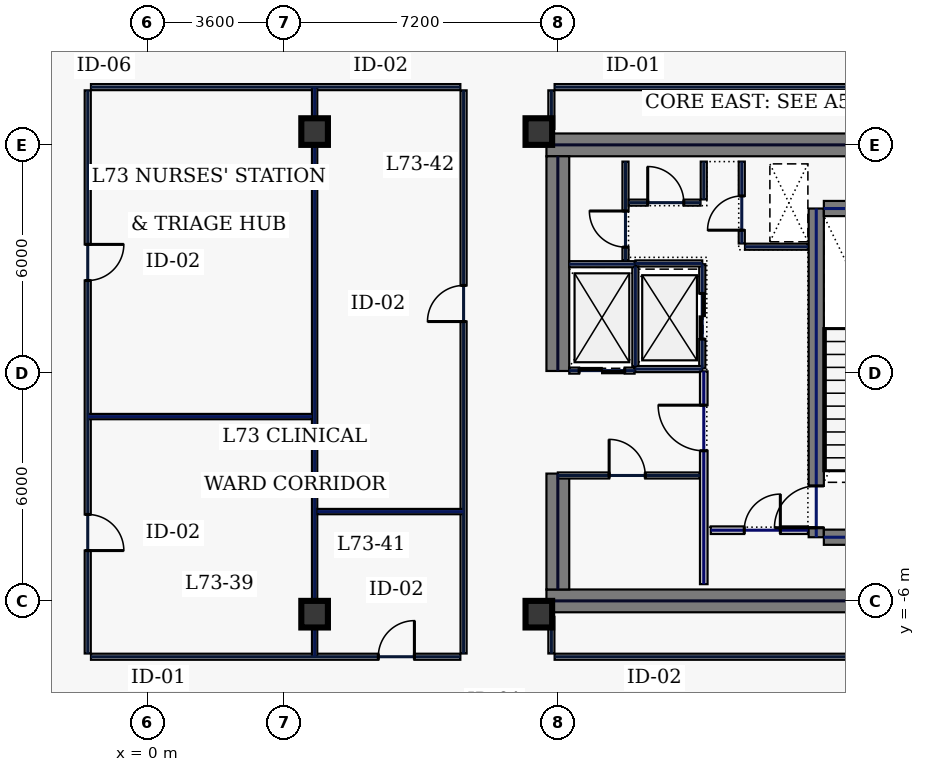
"""IFC4 building model, lengths in metres.
Left out: names, types, materials, properties, quantities, classifications, styles, units other than length and angle.
Written with IfcOpenShell. Run it as: python <this file> out.ifc"""

import sys

from ifc_helpers import new_model, si_unit, direction, frame, frame_2d, origin, origin_2d, place, context, subcontext, project, spatial, rectangle, hollow_rectangle, extrude, element, fill, save


model = new_model("IFC4")
c1 = context("Model", 3, precision=1e-05, world=origin(), true_north=direction((0.0, 1.0)))
c2 = subcontext(c1, "Body", "Model", "MODEL_VIEW")
j1 = project(units=[si_unit("LENGTHUNIT", "METRE"), si_unit("PLANEANGLEUNIT", "RADIAN")], contexts=[c1])
p1 = place(None, origin())
s1 = spatial("IfcSite", under=j1, at=p1, CompositionType="ELEMENT")
p2 = place(p1, origin())
s2 = spatial("IfcBuilding", under=s1, at=p2, CompositionType="ELEMENT")
p3 = place(p2, frame((0.0, 0.0, 313.0)))
s3 = spatial("IfcBuildingStorey", under=s2, at=p3, CompositionType="ELEMENT", Elevation=313.0)
for number, where, z_axis, x_axis in (
    (1, (10.5, 6.0, 0.0), (0.0, 0.0, 1.0), (1.0, 0.0, 0.0)),
    (2, (10.5, -6.0, 0.0), (0.0, 0.0, 1.0), (1.0, 0.0, 0.0)),
):
    element("IfcWall", number, at=place(p3, frame(where, z_axis=z_axis, x_axis=x_axis)), inside=s3, PredefinedType="SHEAR", context=c2, shape_type="SweptSolid", body=[
        extrude(rectangle(XDim=11.5, YDim=0.6, at=frame_2d((5.75, 0.0))), origin(), (0.0, 0.0, 1.0), 3.74),
    ])
p4 = place(p3, frame((10.8, -5.7, 0.0), z_axis=(0.0, 0.0, 1.0), x_axis=(0.0, 1.0, 0.0)))
e3 = element("IfcWall", 3, at=p4, inside=s3, PredefinedType="SHEAR", context=c2, shape_type="SweptSolid", body=[
    extrude(rectangle(XDim=3.05, YDim=0.6, at=frame_2d((1.525, 0.0))), origin(), (0.0, 0.0, 1.0), 3.74),
])
p5 = place(p3, frame((10.8, 0.05, 0.0), z_axis=(0.0, 0.0, 1.0), x_axis=(0.0, 1.0, 0.0)))
e4 = element("IfcWall", 4, at=p5, inside=s3, PredefinedType="SHEAR", context=c2, shape_type="SweptSolid", body=[
    extrude(rectangle(XDim=5.65, YDim=0.6, at=frame_2d((2.825, 0.0))), origin(), (0.0, 0.0, 1.0), 3.74),
])
p6 = place(p3, frame((17.6, -4.325, 0.0), z_axis=(0.0, 0.0, 1.0), x_axis=(0.0, 1.0, 0.0)))
e5 = element("IfcWall", 5, at=p6, inside=s3, PredefinedType="SHEAR", context=c2, shape_type="SweptSolid", body=[
    extrude(rectangle(XDim=8.65, YDim=0.4, at=frame_2d((4.325, 0.0))), origin(), (0.0, 0.0, 1.0), 3.74),
])
p7 = place(p6, frame((0.25, 0.0, 0.0)))
e6 = element("IfcOpeningElement", 6, at=p7, cuts=e5, PredefinedType="OPENING", context=c2, shape_type="SweptSolid", body=[
    extrude(rectangle(XDim=1.1, YDim=2.2, at=frame_2d((0.55, 1.1))), frame((0.0, 0.21, 0.0), z_axis=(0.0, -1.0, 0.0), x_axis=(1.0, 0.0, 0.0)), (0.0, 0.0, 1.0), 0.42),
])
for number, where, z_axis, x_axis in (
    (7, (17.8, -4.325, 0.0), (0.0, 0.0, 1.0), (1.0, 0.0, 0.0)),
    (8, (17.8, 4.325, 0.0), (0.0, 0.0, 1.0), (1.0, 0.0, 0.0)),
):
    element("IfcWall", number, at=place(p3, frame(where, z_axis=z_axis, x_axis=x_axis)), inside=s3, PredefinedType="SHEAR", context=c2, shape_type="SweptSolid", body=[
        extrude(rectangle(XDim=3.4, YDim=0.4, at=frame_2d((1.7, 0.0))), origin(), (0.0, 0.0, 1.0), 3.74),
    ])
for number, where, z_axis, x_axis in (
    (9, (10.3, -6.35, 0.0), (0.0, 0.0, 1.0), (1.0, 0.0, 0.0)),
    (10, (10.3, 6.35, 0.0), (0.0, 0.0, 1.0), (1.0, 0.0, 0.0)),
    (11, (4.4, -6.35, 0.0), (0.0, 0.0, 1.0), (1.0, 0.0, 0.0)),
    (12, (4.4, 6.35, 0.0), (0.0, 0.0, 1.0), (1.0, 0.0, 0.0)),
):
    element("IfcColumn", number, at=place(p3, frame(where, z_axis=z_axis, x_axis=x_axis)), inside=s3, PredefinedType="COLUMN", context=c2, shape_type="SweptSolid", body=[
        extrude(hollow_rectangle(XDim=0.7, YDim=0.7, WallThickness=0.032, at=origin_2d()), origin(), (0.0, 0.0, 1.0), 3.74),
    ])
p8 = place(p3, frame((14.6, 0.12, 0.0), z_axis=(0.0, 0.0, 1.0), x_axis=(0.0, 1.0, 0.0)))
e13 = element("IfcWall", 13, at=p8, inside=s3, PredefinedType="PARTITIONING", context=c2, shape_type="SweptSolid", body=[
    extrude(rectangle(XDim=2.74, YDim=0.16, at=frame_2d((1.37, 0.0))), origin(), (0.0, 0.0, 1.0), 3.74),
])
p9 = place(p8, frame((0.77, 0.0, 0.0)))
e14 = element("IfcOpeningElement", 14, at=p9, cuts=e13, PredefinedType="OPENING", context=c2, shape_type="SweptSolid", body=[
    extrude(rectangle(XDim=1.2, YDim=2.2, at=frame_2d((0.6, 1.1))), frame((0.0, 0.09, 0.0), z_axis=(0.0, -1.0, 0.0), x_axis=(1.0, 0.0, 0.0)), (0.0, 0.0, 1.0), 0.18),
])
for number, where, z_axis, x_axis in (
    (15, (12.84, 0.1, 0.0), (0.0, 0.0, 1.0), (1.0, 0.0, 0.0)),
    (16, (12.84, 2.88, 0.0), (0.0, 0.0, 1.0), (1.0, 0.0, 0.0)),
):
    element("IfcWall", number, at=place(p3, frame(where, z_axis=z_axis, x_axis=x_axis)), inside=s3, PredefinedType="PARTITIONING", context=c2, shape_type="SweptSolid", body=[
        extrude(rectangle(XDim=1.76, YDim=0.16, at=frame_2d((0.88, 0.0))), origin(), (0.0, 0.0, 1.0), 3.74),
    ])
p10 = place(p3, frame((12.84, 0.18, 0.0), z_axis=(0.0, 0.0, 1.0), x_axis=(0.0, 1.0, 0.0)))
e17 = element("IfcWall", 17, at=p10, inside=s3, PredefinedType="PARTITIONING", context=c2, shape_type="SweptSolid", body=[
    extrude(rectangle(XDim=2.62, YDim=0.16, at=frame_2d((1.31, 0.0))), origin(), (0.0, 0.0, 1.0), 3.74),
])
p11 = place(p3, frame((11.1, 0.06, 0.0), z_axis=(0.0, 0.0, 1.0), x_axis=(1.0, 0.0, 0.0)))
e18 = element("IfcWall", 18, at=p11, inside=s3, PredefinedType="PARTITIONING", context=c2, shape_type="SweptSolid", body=[
    extrude(rectangle(XDim=1.72, YDim=0.16, at=frame_2d((0.86, 0.0))), origin(), (0.0, 0.0, 1.0), 3.74),
])
p12 = place(p11, frame((0.26, 0.0, 0.0)))
e19 = element("IfcOpeningElement", 19, at=p12, cuts=e18, PredefinedType="OPENING", context=c2, shape_type="SweptSolid", body=[
    extrude(rectangle(XDim=1.2, YDim=2.2, at=frame_2d((0.6, 1.1))), frame((0.0, 0.09, 0.0), z_axis=(0.0, -1.0, 0.0), x_axis=(1.0, 0.0, 0.0)), (0.0, 0.0, 1.0), 0.18),
])
p13 = place(p3, frame((11.1, 2.86, 0.0), z_axis=(0.0, 0.0, 1.0), x_axis=(1.0, 0.0, 0.0)))
e20 = element("IfcWall", 20, at=p13, inside=s3, PredefinedType="PARTITIONING", context=c2, shape_type="SweptSolid", body=[
    extrude(rectangle(XDim=1.72, YDim=0.16, at=frame_2d((0.86, 0.0))), origin(), (0.0, 0.0, 1.0), 3.74),
])
p14 = place(p3, frame((15.64, 3.405, 0.0), z_axis=(0.0, 0.0, 1.0), x_axis=(0.0, 1.0, 0.0)))
e21 = element("IfcWall", 21, at=p14, inside=s3, PredefinedType="PARTITIONING", context=c2, shape_type="SweptSolid", body=[
    extrude(rectangle(XDim=2.155, YDim=0.16, at=frame_2d((1.078, 0.0))), origin(), (0.0, 0.0, 1.0), 3.74),
])
p15 = place(p14, frame((0.35, 0.0, 0.0)))
e22 = element("IfcOpeningElement", 22, at=p15, cuts=e21, PredefinedType="OPENING", context=c2, shape_type="SweptSolid", body=[
    extrude(rectangle(XDim=0.9, YDim=2.2, at=frame_2d((0.45, 1.1))), frame((0.0, 0.09, 0.0), z_axis=(0.0, -1.0, 0.0), x_axis=(1.0, 0.0, 0.0)), (0.0, 0.0, 1.0), 0.18),
])
p16 = place(p3, frame((15.725, 3.32, 0.0), z_axis=(0.0, 0.0, 1.0), x_axis=(1.0, 0.0, 0.0)))
e23 = element("IfcWall", 23, at=p16, inside=s3, PredefinedType="PARTITIONING", context=c2, shape_type="SweptSolid", body=[
    extrude(rectangle(XDim=1.655, YDim=0.16, at=frame_2d((0.827, 0.0))), origin(), (0.0, 0.0, 1.0), 3.74),
])
p17 = place(p3, frame((14.825, -4.14, 0.0), z_axis=(0.0, 0.0, 1.0), x_axis=(1.0, 0.0, 0.0)))
e24 = element("IfcWall", 24, at=p17, inside=s3, PredefinedType="SOLIDWALL", context=c2, shape_type="SweptSolid", body=[
    extrude(rectangle(XDim=2.555, YDim=0.2, at=frame_2d((1.277, 0.0))), origin(), (0.0, 0.0, 1.0), 3.74),
])
p18 = place(p17, frame((0.88, 0.0, 0.0)))
e25 = element("IfcOpeningElement", 25, at=p18, cuts=e24, PredefinedType="OPENING", context=c2, shape_type="SweptSolid", body=[
    extrude(rectangle(XDim=0.95, YDim=2.2, at=frame_2d((0.475, 1.1))), frame((0.0, 0.11, 0.0), z_axis=(0.0, -1.0, 0.0), x_axis=(1.0, 0.0, 0.0)), (0.0, 0.0, 1.0), 0.22),
])
p19 = place(p3, frame((10.8, -2.7, 0.0), z_axis=(0.0, 0.0, 1.0), x_axis=(1.0, 0.0, 0.0)))
e26 = element("IfcWall", 26, at=p19, inside=s3, PredefinedType="PARTITIONING", context=c2, shape_type="SweptSolid", body=[
    extrude(rectangle(XDim=3.735, YDim=0.16, at=frame_2d((1.867, 0.0))), origin(), (0.0, 0.0, 1.0), 3.74),
])
p20 = place(p19, frame((1.35, 0.0, 0.0)))
e27 = element("IfcOpeningElement", 27, at=p20, cuts=e26, PredefinedType="OPENING", context=c2, shape_type="SweptSolid", body=[
    extrude(rectangle(XDim=0.95, YDim=2.2, at=frame_2d((0.475, 1.1))), frame((0.0, 0.09, 0.0), z_axis=(0.0, -1.0, 0.0), x_axis=(1.0, 0.0, 0.0)), (0.0, 0.0, 1.0), 0.18),
])
p21 = place(p3, frame((12.58, 2.96, 0.0), z_axis=(0.0, 0.0, 1.0), x_axis=(0.0, 1.0, 0.0)))
e28 = element("IfcWall", 28, at=p21, inside=s3, PredefinedType="PARTITIONING", context=c2, shape_type="SweptSolid", body=[
    extrude(rectangle(XDim=2.6, YDim=0.16, at=frame_2d((1.3, 0.0))), origin(), (0.0, 0.0, 1.0), 3.74),
])
p22 = place(p21, frame((0.35, 0.0, 0.0)))
e29 = element("IfcOpeningElement", 29, at=p22, cuts=e28, PredefinedType="OPENING", context=c2, shape_type="SweptSolid", body=[
    extrude(rectangle(XDim=0.95, YDim=2.2, at=frame_2d((0.475, 1.1))), frame((0.0, 0.09, 0.0), z_axis=(0.0, -1.0, 0.0), x_axis=(1.0, 0.0, 0.0)), (0.0, 0.0, 1.0), 0.18),
])
p23 = place(p3, frame((12.665, 4.48, 0.0), z_axis=(0.0, 0.0, 1.0), x_axis=(1.0, 0.0, 0.0)))
e30 = element("IfcWall", 30, at=p23, inside=s3, PredefinedType="PARTITIONING", context=c2, shape_type="SweptSolid", body=[
    extrude(rectangle(XDim=1.89, YDim=0.16, at=frame_2d((0.945, 0.0))), origin(), (0.0, 0.0, 1.0), 3.74),
])
p24 = place(p23, frame((0.5, 0.0, 0.0)))
e31 = element("IfcOpeningElement", 31, at=p24, cuts=e30, PredefinedType="OPENING", context=c2, shape_type="SweptSolid", body=[
    extrude(rectangle(XDim=0.95, YDim=2.2, at=frame_2d((0.475, 1.1))), frame((0.0, 0.09, 0.0), z_axis=(0.0, -1.0, 0.0), x_axis=(1.0, 0.0, 0.0)), (0.0, 0.0, 1.0), 0.18),
])
p25 = place(p3, frame((14.64, 4.565, 0.0), z_axis=(0.0, 0.0, 1.0), x_axis=(0.0, 1.0, 0.0)))
e32 = element("IfcWall", 32, at=p25, inside=s3, PredefinedType="PARTITIONING", context=c2, shape_type="SweptSolid", body=[
    extrude(rectangle(XDim=0.995, YDim=0.16, at=frame_2d((0.498, 0.0))), origin(), (0.0, 0.0, 1.0), 3.74),
])
p26 = place(p3, frame((14.64, -5.56, 0.0), z_axis=(0.0, 0.0, 1.0), x_axis=(0.0, 1.0, 0.0)))
e33 = element("IfcWall", 33, at=p26, inside=s3, PredefinedType="SOLIDWALL", context=c2, shape_type="SweptSolid", body=[
    extrude(rectangle(XDim=5.6, YDim=0.2, at=frame_2d((2.8, 0.0))), origin(), (0.0, 0.0, 1.0), 3.74),
])
p27 = place(p26, frame((3.51, 0.0, 0.0)))
e34 = element("IfcOpeningElement", 34, at=p27, cuts=e33, PredefinedType="OPENING", context=c2, shape_type="SweptSolid", body=[
    extrude(rectangle(XDim=1.2, YDim=2.2, at=frame_2d((0.6, 1.1))), frame((0.0, 0.11, 0.0), z_axis=(0.0, -1.0, 0.0), x_axis=(1.0, 0.0, 0.0)), (0.0, 0.0, 1.0), 0.22),
])
p28 = place(p3, frame((21.915, 7.52, 0.0), z_axis=(0.0, 0.0, 1.0), x_axis=(-1.0, 0.0, 0.0)))
e35 = element("IfcWall", 35, at=p28, inside=s3, PredefinedType="PARTITIONING", context=c2, shape_type="SweptSolid", body=[
    extrude(rectangle(XDim=11.2, YDim=0.16, at=frame_2d((5.6, 0.0))), origin(), (0.0, 0.0, 1.0), 3.74),
])
p29 = place(p3, frame((10.63, 7.435, 0.0), z_axis=(0.0, 0.0, 1.0), x_axis=(0.0, -1.0, 0.0)))
e36 = element("IfcWall", 36, at=p29, inside=s3, PredefinedType="PARTITIONING", context=c2, shape_type="SweptSolid", body=[
    extrude(rectangle(XDim=1.015, YDim=0.16, at=frame_2d((0.508, 0.0))), origin(), (0.0, 0.0, 1.0), 3.74),
])
p30 = place(p3, frame((10.63, -6.42, 0.0), z_axis=(0.0, 0.0, 1.0), x_axis=(0.0, -1.0, 0.0)))
e37 = element("IfcWall", 37, at=p30, inside=s3, PredefinedType="PARTITIONING", context=c2, shape_type="SweptSolid", body=[
    extrude(rectangle(XDim=0.965, YDim=0.16, at=frame_2d((0.482, 0.0))), origin(), (0.0, 0.0, 1.0), 3.74),
])
p31 = place(p3, frame((10.715, -7.47, 0.0), z_axis=(0.0, 0.0, 1.0), x_axis=(1.0, 0.0, 0.0)))
e38 = element("IfcWall", 38, at=p31, inside=s3, PredefinedType="PARTITIONING", context=c2, shape_type="SweptSolid", body=[
    extrude(rectangle(XDim=11.2, YDim=0.16, at=frame_2d((5.6, 0.0))), origin(), (0.0, 0.0, 1.0), 3.74),
])
p32 = place(p3, frame((8.235, 7.52, 0.0), z_axis=(0.0, 0.0, 1.0), x_axis=(-1.0, 0.0, 0.0)))
e39 = element("IfcWall", 39, at=p32, inside=s3, PredefinedType="PARTITIONING", context=c2, shape_type="SweptSolid", body=[
    extrude(rectangle(XDim=9.72, YDim=0.16, at=frame_2d((4.86, 0.0))), origin(), (0.0, 0.0, 1.0), 3.74),
])
p33 = place(p3, frame((-1.57, 7.435, 0.0), z_axis=(0.0, 0.0, 1.0), x_axis=(0.0, -1.0, 0.0)))
e40 = element("IfcWall", 40, at=p33, inside=s3, PredefinedType="PARTITIONING", context=c2, shape_type="SweptSolid", body=[
    extrude(rectangle(XDim=14.82, YDim=0.16, at=frame_2d((7.41, 0.0))), origin(), (0.0, 0.0, 1.0), 3.74),
])
p34 = place(p33, frame((11.161, 0.0, 0.0)))
e41 = element("IfcOpeningElement", 41, at=p34, cuts=e40, PredefinedType="OPENING", context=c2, shape_type="SweptSolid", body=[
    extrude(rectangle(XDim=0.95, YDim=2.2, at=frame_2d((0.475, 1.1))), frame((0.0, 0.09, 0.0), z_axis=(0.0, -1.0, 0.0), x_axis=(1.0, 0.0, 0.0)), (0.0, 0.0, 1.0), 0.18),
])
p35 = place(p33, frame((4.054, 0.0, 0.0)))
e42 = element("IfcOpeningElement", 42, at=p35, cuts=e40, PredefinedType="OPENING", context=c2, shape_type="SweptSolid", body=[
    extrude(rectangle(XDim=0.95, YDim=2.2, at=frame_2d((0.475, 1.1))), frame((0.0, 0.09, 0.0), z_axis=(0.0, -1.0, 0.0), x_axis=(1.0, 0.0, 0.0)), (0.0, 0.0, 1.0), 0.18),
])
p36 = place(p3, frame((-1.485, -7.47, 0.0), z_axis=(0.0, 0.0, 1.0), x_axis=(1.0, 0.0, 0.0)))
e43 = element("IfcWall", 43, at=p36, inside=s3, PredefinedType="PARTITIONING", context=c2, shape_type="SweptSolid", body=[
    extrude(rectangle(XDim=9.72, YDim=0.16, at=frame_2d((4.86, 0.0))), origin(), (0.0, 0.0, 1.0), 3.74),
])
p37 = place(p36, frame((7.561, 0.0, 0.0)))
e44 = element("IfcOpeningElement", 44, at=p37, cuts=e43, PredefinedType="OPENING", context=c2, shape_type="SweptSolid", body=[
    extrude(rectangle(XDim=0.95, YDim=2.2, at=frame_2d((0.475, 1.1))), frame((0.0, 0.09, 0.0), z_axis=(0.0, -1.0, 0.0), x_axis=(1.0, 0.0, 0.0)), (0.0, 0.0, 1.0), 0.18),
])
p38 = place(p3, frame((8.32, -7.385, 0.0), z_axis=(0.0, 0.0, 1.0), x_axis=(0.0, 1.0, 0.0)))
e45 = element("IfcWall", 45, at=p38, inside=s3, PredefinedType="PARTITIONING", context=c2, shape_type="SweptSolid", body=[
    extrude(rectangle(XDim=14.82, YDim=0.16, at=frame_2d((7.41, 0.0))), origin(), (0.0, 0.0, 1.0), 3.74),
])
p39 = place(p38, frame((8.736, 0.0, 0.0)))
e46 = element("IfcOpeningElement", 46, at=p39, cuts=e45, PredefinedType="OPENING", context=c2, shape_type="SweptSolid", body=[
    extrude(rectangle(XDim=0.95, YDim=2.2, at=frame_2d((0.475, 1.1))), frame((0.0, 0.09, 0.0), z_axis=(0.0, -1.0, 0.0), x_axis=(1.0, 0.0, 0.0)), (0.0, 0.0, 1.0), 0.18),
])
p40 = place(p3, frame((4.4, -7.465, 0.0), z_axis=(0.0, 0.0, 1.0), x_axis=(0.0, 1.0, 0.0)))
e47 = element("IfcWall", 47, at=p40, inside=s3, PredefinedType="PARTITIONING", context=c2, shape_type="SweptSolid", body=[
    extrude(rectangle(XDim=14.98, YDim=0.14, at=frame_2d((7.49, 0.0))), origin(), (0.0, 0.0, 1.0), 1.535),
])
p41 = place(p3, frame((-1.565, -1.15, 0.0), z_axis=(0.0, 0.0, 1.0), x_axis=(1.0, 0.0, 0.0)))
e48 = element("IfcWall", 48, at=p41, inside=s3, PredefinedType="PARTITIONING", context=c2, shape_type="SweptSolid", body=[
    extrude(rectangle(XDim=5.89, YDim=0.14, at=frame_2d((2.945, 0.0))), origin(), (0.0, 0.0, 1.0), 3.74),
])
p42 = place(p3, frame((4.475, -3.65, 0.0), z_axis=(0.0, 0.0, 1.0), x_axis=(1.0, 0.0, 0.0)))
e49 = element("IfcWall", 49, at=p42, inside=s3, PredefinedType="PARTITIONING", context=c2, shape_type="SweptSolid", body=[
    extrude(rectangle(XDim=3.84, YDim=0.14, at=frame_2d((1.92, 0.0))), origin(), (0.0, 0.0, 1.0), 3.74),
])
p43 = place(p7, origin())
e50 = element("IfcDoor", 50, at=p43, inside=s3, OperationType="SINGLE_SWING_LEFT", PredefinedType="DOOR", context=c2, shape_type="SweptSolid", body=[
    extrude(rectangle(XDim=1.1, YDim=2.2, at=frame_2d((0.55, 1.1))), frame((0.0, 0.025, 0.0), z_axis=(0.0, -1.0, 0.0), x_axis=(1.0, 0.0, 0.0)), (0.0, 0.0, 1.0), 0.05),
])
fill(e6, e50)
p44 = place(p9, origin())
e51 = element("IfcDoor", 51, at=p44, inside=s3, OperationType="SLIDING_TO_LEFT", PredefinedType="DOOR", context=c2, shape_type="SweptSolid", body=[
    extrude(rectangle(XDim=1.2, YDim=2.2, at=frame_2d((0.6, 1.1))), frame((0.0, 0.025, 0.0), z_axis=(0.0, -1.0, 0.0), x_axis=(1.0, 0.0, 0.0)), (0.0, 0.0, 1.0), 0.05),
])
fill(e14, e51)
p45 = place(p12, origin())
e52 = element("IfcDoor", 52, at=p45, inside=s3, OperationType="SLIDING_TO_LEFT", PredefinedType="DOOR", context=c2, shape_type="SweptSolid", body=[
    extrude(rectangle(XDim=1.2, YDim=2.2, at=frame_2d((0.6, 1.1))), frame((0.0, 0.025, 0.0), z_axis=(0.0, -1.0, 0.0), x_axis=(1.0, 0.0, 0.0)), (0.0, 0.0, 1.0), 0.05),
])
fill(e19, e52)
p46 = place(p15, origin())
e53 = element("IfcDoor", 53, at=p46, inside=s3, OperationType="SINGLE_SWING_LEFT", PredefinedType="DOOR", context=c2, shape_type="SweptSolid", body=[
    extrude(rectangle(XDim=0.9, YDim=2.2, at=frame_2d((0.45, 1.1))), frame((0.0, 0.025, 0.0), z_axis=(0.0, -1.0, 0.0), x_axis=(1.0, 0.0, 0.0)), (0.0, 0.0, 1.0), 0.05),
])
fill(e22, e53)
p47 = place(p18, origin())
e54 = element("IfcDoor", 54, at=p47, inside=s3, OperationType="SINGLE_SWING_RIGHT", PredefinedType="DOOR", context=c2, shape_type="SweptSolid", body=[
    extrude(rectangle(XDim=0.95, YDim=2.2, at=frame_2d((0.475, 1.1))), frame((0.0, 0.025, 0.0), z_axis=(0.0, -1.0, 0.0), x_axis=(1.0, 0.0, 0.0)), (0.0, 0.0, 1.0), 0.05),
])
fill(e25, e54)
p48 = place(p20, origin())
e55 = element("IfcDoor", 55, at=p48, inside=s3, OperationType="SINGLE_SWING_LEFT", PredefinedType="DOOR", context=c2, shape_type="SweptSolid", body=[
    extrude(rectangle(XDim=0.95, YDim=2.2, at=frame_2d((0.475, 1.1))), frame((0.0, 0.025, 0.0), z_axis=(0.0, -1.0, 0.0), x_axis=(1.0, 0.0, 0.0)), (0.0, 0.0, 1.0), 0.05),
])
fill(e27, e55)
p49 = place(p22, origin())
e56 = element("IfcDoor", 56, at=p49, inside=s3, OperationType="SINGLE_SWING_RIGHT", PredefinedType="DOOR", context=c2, shape_type="SweptSolid", body=[
    extrude(rectangle(XDim=0.95, YDim=2.2, at=frame_2d((0.475, 1.1))), frame((0.0, 0.025, 0.0), z_axis=(0.0, -1.0, 0.0), x_axis=(1.0, 0.0, 0.0)), (0.0, 0.0, 1.0), 0.05),
])
fill(e29, e56)
p50 = place(p24, origin())
e57 = element("IfcDoor", 57, at=p50, inside=s3, OperationType="SINGLE_SWING_LEFT", PredefinedType="DOOR", context=c2, shape_type="SweptSolid", body=[
    extrude(rectangle(XDim=0.95, YDim=2.2, at=frame_2d((0.475, 1.1))), frame((0.0, 0.025, 0.0), z_axis=(0.0, -1.0, 0.0), x_axis=(1.0, 0.0, 0.0)), (0.0, 0.0, 1.0), 0.05),
])
fill(e31, e57)
p51 = place(p27, origin())
e58 = element("IfcDoor", 58, at=p51, inside=s3, OperationType="SINGLE_SWING_RIGHT", PredefinedType="DOOR", context=c2, shape_type="SweptSolid", body=[
    extrude(rectangle(XDim=1.2, YDim=2.2, at=frame_2d((0.6, 1.1))), frame((0.0, 0.025, 0.0), z_axis=(0.0, -1.0, 0.0), x_axis=(1.0, 0.0, 0.0)), (0.0, 0.0, 1.0), 0.05),
])
fill(e34, e58)
p52 = place(p34, origin())
e59 = element("IfcDoor", 59, at=p52, inside=s3, OperationType="SINGLE_SWING_RIGHT", PredefinedType="DOOR", context=c2, shape_type="SweptSolid", body=[
    extrude(rectangle(XDim=0.95, YDim=2.2, at=frame_2d((0.475, 1.1))), frame((0.0, 0.025, 0.0), z_axis=(0.0, -1.0, 0.0), x_axis=(1.0, 0.0, 0.0)), (0.0, 0.0, 1.0), 0.05),
])
fill(e41, e59)
p53 = place(p35, origin())
e60 = element("IfcDoor", 60, at=p53, inside=s3, OperationType="SINGLE_SWING_LEFT", PredefinedType="DOOR", context=c2, shape_type="SweptSolid", body=[
    extrude(rectangle(XDim=0.95, YDim=2.2, at=frame_2d((0.475, 1.1))), frame((0.0, 0.025, 0.0), z_axis=(0.0, -1.0, 0.0), x_axis=(1.0, 0.0, 0.0)), (0.0, 0.0, 1.0), 0.05),
])
fill(e42, e60)
p54 = place(p37, origin())
e61 = element("IfcDoor", 61, at=p54, inside=s3, OperationType="SINGLE_SWING_RIGHT", PredefinedType="DOOR", context=c2, shape_type="SweptSolid", body=[
    extrude(rectangle(XDim=0.95, YDim=2.2, at=frame_2d((0.475, 1.1))), frame((0.0, 0.025, 0.0), z_axis=(0.0, -1.0, 0.0), x_axis=(1.0, 0.0, 0.0)), (0.0, 0.0, 1.0), 0.05),
])
fill(e44, e61)
p55 = place(p39, origin())
e62 = element("IfcDoor", 62, at=p55, inside=s3, OperationType="SINGLE_SWING_LEFT", PredefinedType="DOOR", context=c2, shape_type="SweptSolid", body=[
    extrude(rectangle(XDim=0.95, YDim=2.2, at=frame_2d((0.475, 1.1))), frame((0.0, 0.025, 0.0), z_axis=(0.0, -1.0, 0.0), x_axis=(1.0, 0.0, 0.0)), (0.0, 0.0, 1.0), 0.05),
])
fill(e46, e62)
save(model, sys.argv[1])
